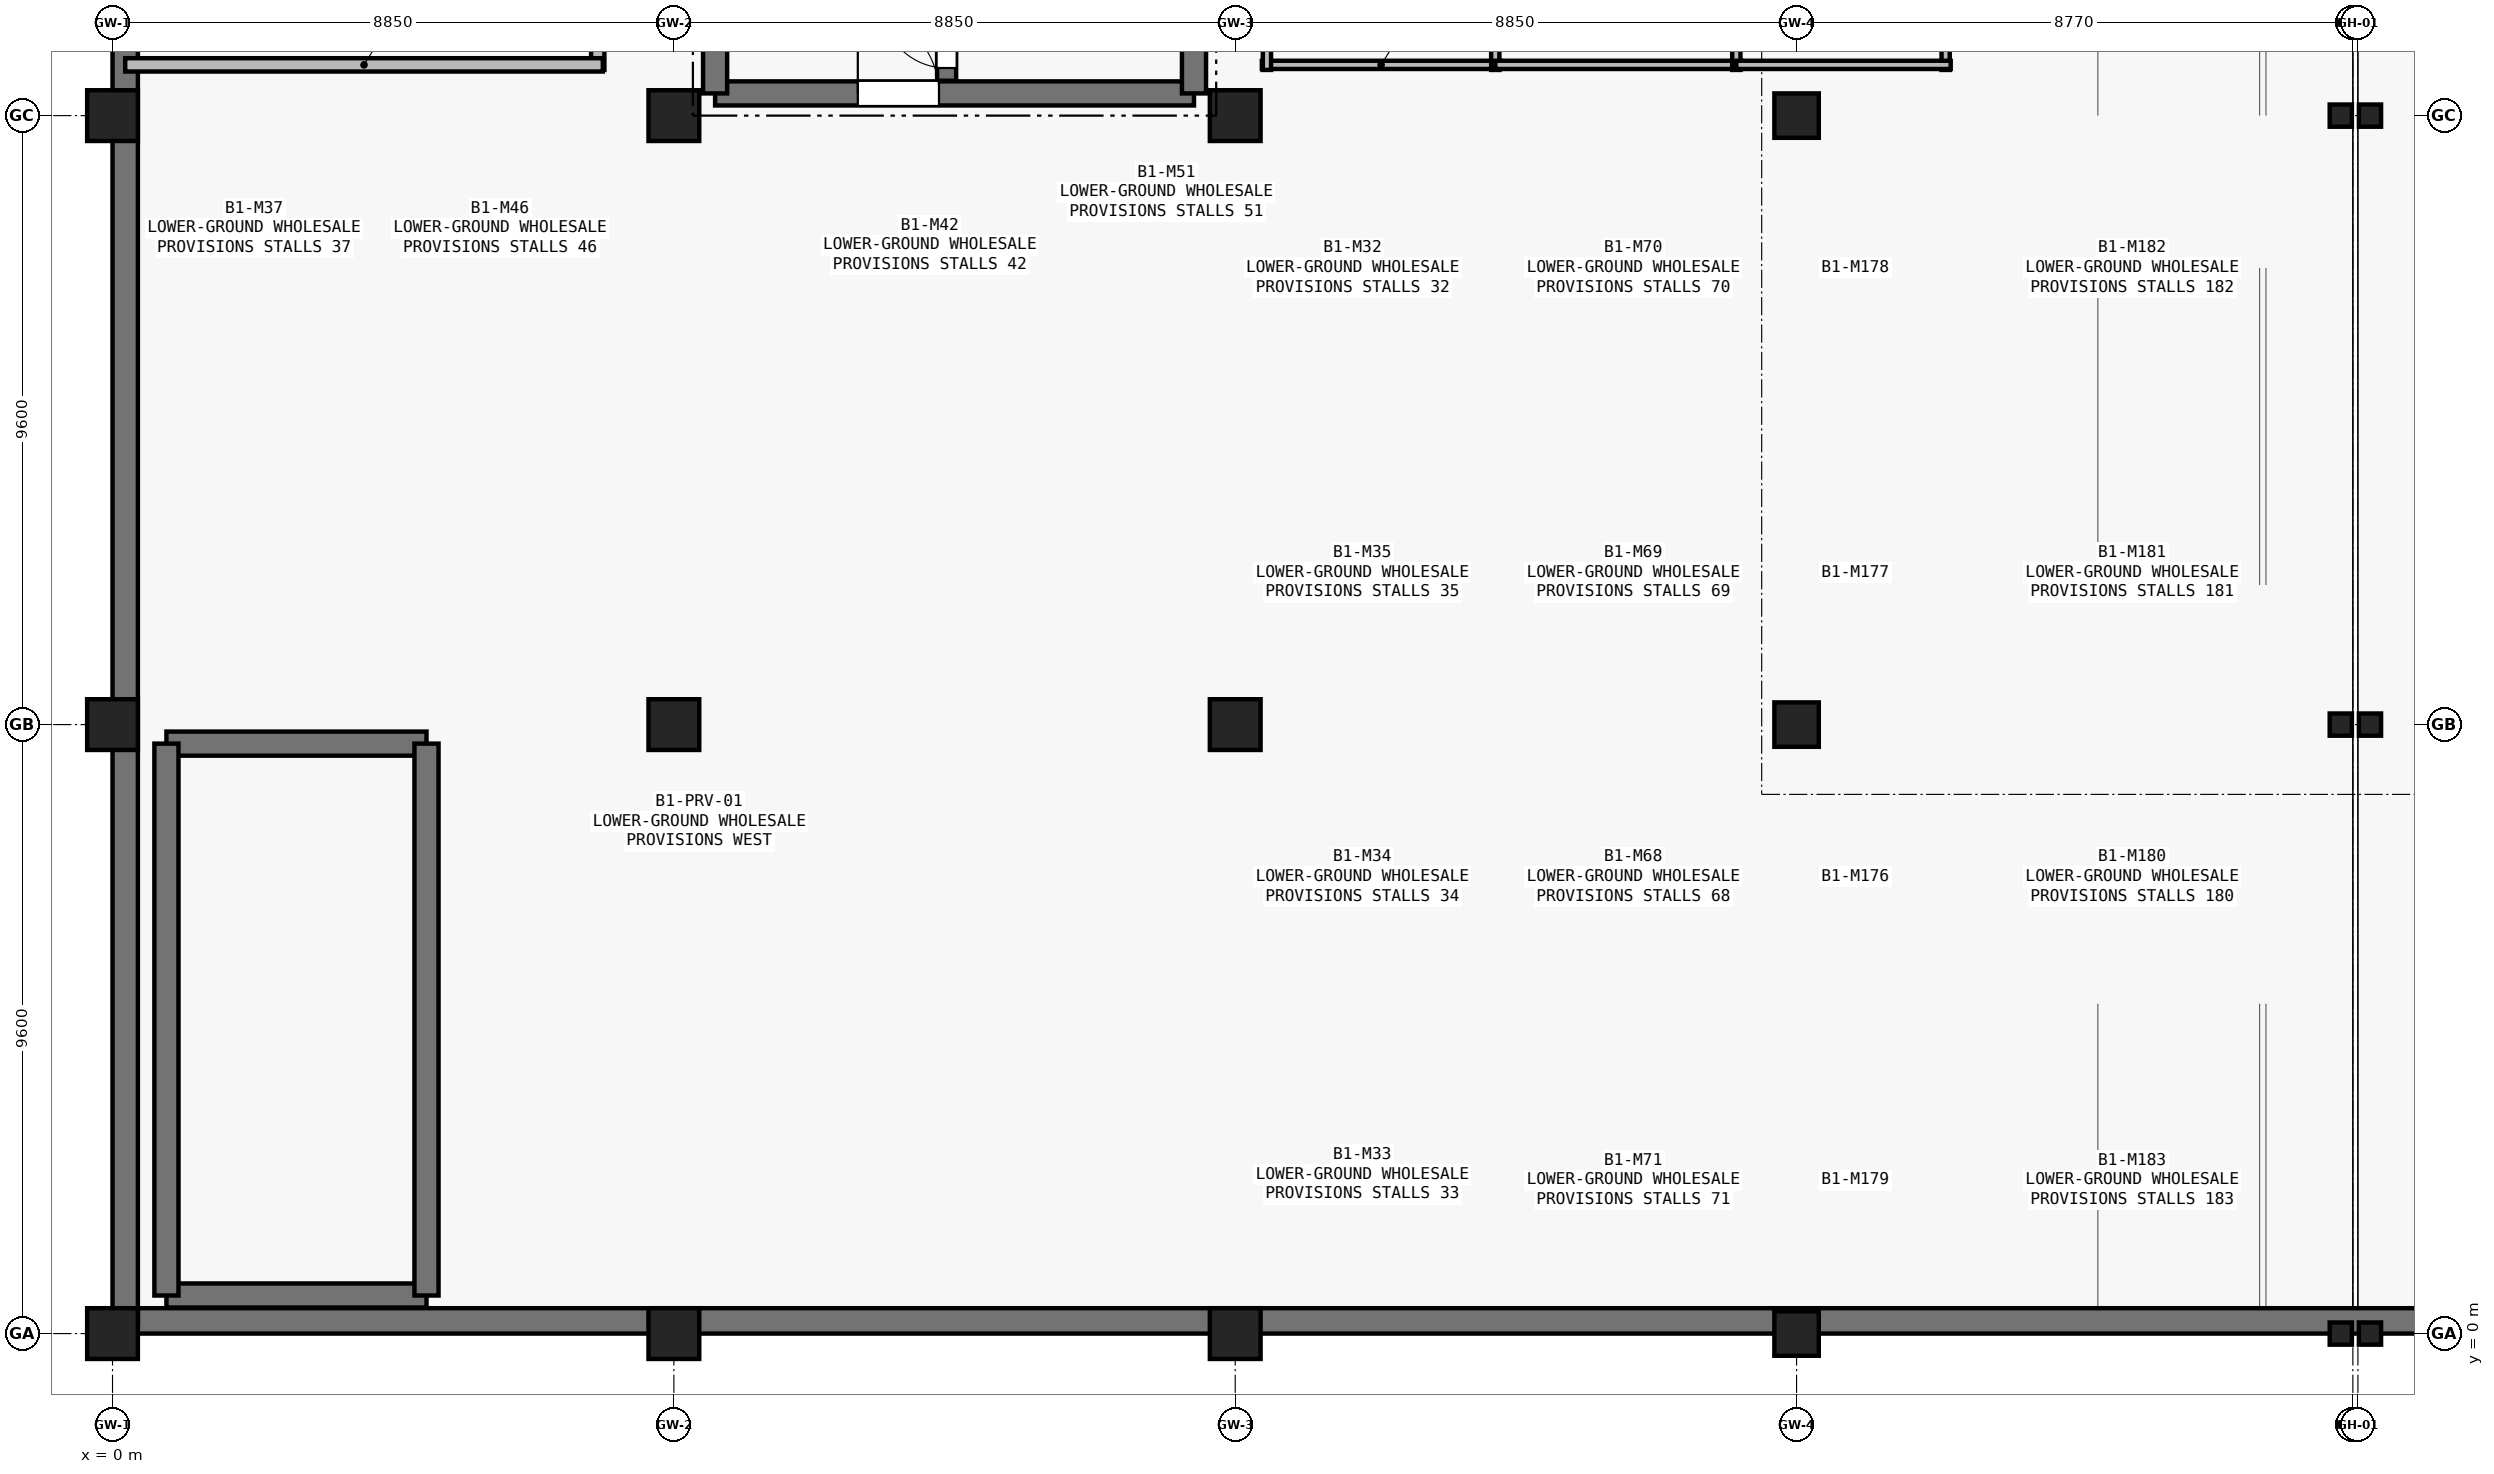
"""IFC4 building model, lengths in metres.
Left out: names, types, materials, properties, quantities, classifications, styles, units other than length and angle.
Written with IfcOpenShell. Run it as: python <this file> out.ifc"""

import sys

from ifc_helpers import new_model, si_unit, direction, frame, frame_2d, origin, origin_2d, place, context, subcontext, project, spatial, rectangle, i_section, extrude, element, fill, save


model = new_model("IFC4")
c1 = context("Model", 3, precision=1e-05, world=origin(), true_north=direction((0.0, 1.0)))
c2 = subcontext(c1, "Body", "Model", "MODEL_VIEW")
j1 = project(units=[si_unit("LENGTHUNIT", "METRE"), si_unit("PLANEANGLEUNIT", "RADIAN")], contexts=[c1])
p1 = place(None, origin())
s1 = spatial("IfcSite", under=j1, at=p1, CompositionType="ELEMENT")
p2 = place(p1, origin())
s2 = spatial("IfcBuilding", under=s1, at=p2, CompositionType="ELEMENT")
p3 = place(p2, frame((0.0, 0.0, -5.4)))
s3 = spatial("IfcBuildingStorey", under=s2, at=p3, CompositionType="ELEMENT", Elevation=-5.4)
for number, where, z_axis, x_axis in (
    (1, (0.0, 0.0, 0.0), (0.0, 0.0, 1.0), (1.0, 0.0, 0.0)),
    (2, (0.0, 9.6, 0.0), (0.0, 0.0, 1.0), (1.0, 0.0, 0.0)),
    (3, (0.0, 19.2, 0.0), (0.0, 0.0, 1.0), (1.0, 0.0, 0.0)),
    (4, (8.85, 0.0, 0.0), (0.0, 0.0, 1.0), (1.0, 0.0, 0.0)),
    (5, (8.85, 9.6, 0.0), (0.0, 0.0, 1.0), (1.0, 0.0, 0.0)),
    (6, (8.85, 19.2, 0.0), (0.0, 0.0, 1.0), (1.0, 0.0, 0.0)),
    (7, (17.7, 0.0, 0.0), (0.0, 0.0, 1.0), (1.0, 0.0, 0.0)),
    (8, (17.7, 9.6, 0.0), (0.0, 0.0, 1.0), (1.0, 0.0, 0.0)),
    (9, (17.7, 19.2, 0.0), (0.0, 0.0, 1.0), (1.0, 0.0, 0.0)),
):
    element("IfcColumn", number, at=place(p3, frame(where, z_axis=z_axis, x_axis=x_axis)), inside=s3, PredefinedType="COLUMN", context=c2, shape_type="SweptSolid", body=[
        extrude(rectangle(XDim=0.8, YDim=0.8, at=origin_2d()), origin(), (0.0, 0.0, 1.0), 5.4),
    ])
for number, where, z_axis, x_axis in (
    (10, (26.55, 0.0, 0.0), (0.0, 0.0, 1.0), (1.0, 0.0, 0.0)),
    (11, (26.55, 9.6, 0.0), (0.0, 0.0, 1.0), (1.0, 0.0, 0.0)),
    (12, (26.55, 19.2, 0.0), (0.0, 0.0, 1.0), (1.0, 0.0, 0.0)),
):
    element("IfcColumn", number, at=place(p3, frame(where, z_axis=z_axis, x_axis=x_axis)), inside=s3, PredefinedType="COLUMN", context=c2, shape_type="SweptSolid", body=[
        extrude(rectangle(XDim=0.7, YDim=0.7, at=origin_2d()), origin(), (0.0, 0.0, 1.0), 5.4),
    ])
for number, where, z_axis, x_axis in (
    (13, (35.13, 0.0, 0.0), (0.0, 0.0, 1.0), (1.0, 0.0, 0.0)),
    (14, (35.13, 9.6, 0.0), (0.0, 0.0, 1.0), (1.0, 0.0, 0.0)),
    (15, (35.13, 19.2, 0.0), (0.0, 0.0, 1.0), (1.0, 0.0, 0.0)),
    (16, (35.59, 0.0, 0.0), (0.0, 0.0, 1.0), (1.0, 0.0, 0.0)),
    (17, (35.59, 9.6, 0.0), (0.0, 0.0, 1.0), (1.0, 0.0, 0.0)),
    (18, (35.59, 19.2, 0.0), (0.0, 0.0, 1.0), (1.0, 0.0, 0.0)),
):
    element("IfcColumn", number, at=place(p3, frame(where, z_axis=z_axis, x_axis=x_axis)), inside=s3, PredefinedType="COLUMN", context=c2, shape_type="SweptSolid", body=[
        extrude(i_section(OverallWidth=0.35, OverallDepth=0.35, WebThickness=0.012, FlangeThickness=0.019, FilletRadius=0.02, at=origin_2d()), origin(), (0.0, 0.0, 1.0), 5.4),
    ])
p4 = place(p3, frame((102.6, 0.2, 0.0), z_axis=(0.0, 0.0, 1.0), x_axis=(-1.0, 0.0, 0.0)))
e19 = element("IfcWall", 19, at=p4, inside=s3, PredefinedType="USERDEFINED", context=c2, shape_type="SweptSolid", body=[
    extrude(rectangle(XDim=102.4, YDim=0.4, at=frame_2d((51.2, 0.0))), origin(), (0.0, 0.0, 1.0), 4.85),
])
p5 = place(p3, frame((0.2, 0.2, 0.0), z_axis=(0.0, 0.0, 1.0), x_axis=(0.0, 1.0, 0.0)))
e20 = element("IfcWall", 20, at=p5, inside=s3, PredefinedType="USERDEFINED", context=c2, shape_type="SweptSolid", body=[
    extrude(rectangle(XDim=35.6, YDim=0.4, at=frame_2d((17.8, 0.0))), origin(), (0.0, 0.0, 1.0), 4.85),
])
p6 = place(p3, frame((9.5, 19.55, 0.0), z_axis=(0.0, 0.0, 1.0), x_axis=(1.0, 0.0, 0.0)))
e21 = element("IfcWall", 21, at=p6, inside=s3, PredefinedType="SHEAR", context=c2, shape_type="SweptSolid", body=[
    extrude(rectangle(XDim=7.55, YDim=0.38, at=frame_2d((3.775, 0.0))), origin(), (0.0, 0.0, 1.0), 5.4),
])
p7 = place(p6, frame((2.25, 0.0, 0.0)))
e22 = element("IfcOpeningElement", 22, at=p7, cuts=e21, PredefinedType="OPENING", context=c2, shape_type="SweptSolid", body=[
    extrude(rectangle(XDim=1.28, YDim=2.15, at=frame_2d((0.64, 1.075))), frame((0.0, 0.2, 0.0), z_axis=(0.0, -1.0, 0.0), x_axis=(1.0, 0.0, 0.0)), (0.0, 0.0, 1.0), 0.4),
])
for number, where, z_axis, x_axis in (
    (23, (9.5, 28.35, 0.0), (0.0, 0.0, 1.0), (0.0, -1.0, 0.0)),
    (24, (17.05, 19.55, 0.0), (0.0, 0.0, 1.0), (0.0, 1.0, 0.0)),
):
    element("IfcWall", number, at=place(p3, frame(where, z_axis=z_axis, x_axis=x_axis)), inside=s3, PredefinedType="SHEAR", context=c2, shape_type="SweptSolid", body=[
        extrude(rectangle(XDim=8.8, YDim=0.38, at=frame_2d((4.4, 0.0))), origin(), (0.0, 0.0, 1.0), 5.4),
    ])
p8 = place(p3, frame((13.15, 19.75, 0.0), z_axis=(0.0, 0.0, 1.0), x_axis=(0.0, 1.0, 0.0)))
e25 = element("IfcWall", 25, at=p8, inside=s3, PredefinedType="SHEAR", context=c2, shape_type="SweptSolid", body=[
    extrude(rectangle(XDim=8.4, YDim=0.3, at=frame_2d((4.2, 0.0))), origin(), (0.0, 0.0, 1.0), 5.4),
])
p9 = place(p8, frame((0.2, 0.0, 0.0)))
e26 = element("IfcOpeningElement", 26, at=p9, cuts=e25, PredefinedType="OPENING", context=c2, shape_type="SweptSolid", body=[
    extrude(rectangle(XDim=1.02, YDim=2.1, at=frame_2d((0.51, 1.05))), frame((0.0, 0.16, 0.0), z_axis=(0.0, -1.0, 0.0), x_axis=(1.0, 0.0, 0.0)), (0.0, 0.0, 1.0), 0.32),
])
for number, where, z_axis, x_axis in (
    (27, (0.85, 0.6, 0.0), (0.0, 0.0, 1.0), (1.0, 0.0, 0.0)),
    (28, (4.95, 9.3, 0.0), (0.0, 0.0, 1.0), (-1.0, 0.0, 0.0)),
):
    element("IfcWall", number, at=place(p3, frame(where, z_axis=z_axis, x_axis=x_axis)), inside=s3, PredefinedType="SHEAR", context=c2, shape_type="SweptSolid", body=[
        extrude(rectangle(XDim=4.1, YDim=0.38, at=frame_2d((2.05, 0.0))), origin(), (0.0, 0.0, 1.0), 5.4),
    ])
for number, where, z_axis, x_axis in (
    (29, (0.85, 9.3, 0.0), (0.0, 0.0, 1.0), (0.0, -1.0, 0.0)),
    (30, (4.95, 0.6, 0.0), (0.0, 0.0, 1.0), (0.0, 1.0, 0.0)),
):
    element("IfcWall", number, at=place(p3, frame(where, z_axis=z_axis, x_axis=x_axis)), inside=s3, PredefinedType="SHEAR", context=c2, shape_type="SweptSolid", body=[
        extrude(rectangle(XDim=8.7, YDim=0.38, at=frame_2d((4.35, 0.0))), origin(), (0.0, 0.0, 1.0), 5.4),
    ])
p10 = place(p3, frame((18.12, 20.0, 0.0), z_axis=(0.0, 0.0, 1.0), x_axis=(1.0, 0.0, 0.0)))
e31 = element("IfcWall", 31, at=p10, inside=s3, PredefinedType="PARTITIONING", context=c2, shape_type="SweptSolid", body=[
    extrude(rectangle(XDim=3.76, YDim=0.13, at=frame_2d((1.88, 0.0))), origin(), (0.0, 0.0, 1.0), 4.92),
])
for number, where, z_axis, x_axis in (
    (32, (21.8, 19.92, 0.0), (0.0, 0.0, 1.0), (0.0, 1.0, 0.0)),
    (33, (18.2, 24.08, 0.0), (0.0, 0.0, 1.0), (0.0, -1.0, 0.0)),
):
    element("IfcWall", number, at=place(p3, frame(where, z_axis=z_axis, x_axis=x_axis)), inside=s3, PredefinedType="PARTITIONING", context=c2, shape_type="SweptSolid", body=[
        extrude(rectangle(XDim=4.16, YDim=0.13, at=frame_2d((2.08, 0.0))), origin(), (0.0, 0.0, 1.0), 4.92),
    ])
p11 = place(p3, frame((21.8, 20.0, 0.0), z_axis=(0.0, 0.0, 1.0), x_axis=(1.0, 0.0, 0.0)))
e34 = element("IfcWall", 34, at=p11, inside=s3, PredefinedType="PARTITIONING", context=c2, shape_type="SweptSolid", body=[
    extrude(rectangle(XDim=3.88, YDim=0.13, at=frame_2d((1.94, 0.0))), origin(), (0.0, 0.0, 1.0), 4.92),
])
p12 = place(p3, frame((25.6, 19.92, 0.0), z_axis=(0.0, 0.0, 1.0), x_axis=(0.0, 1.0, 0.0)))
e35 = element("IfcWall", 35, at=p12, inside=s3, PredefinedType="PARTITIONING", context=c2, shape_type="SweptSolid", body=[
    extrude(rectangle(XDim=4.16, YDim=0.13, at=frame_2d((2.08, 0.0))), origin(), (0.0, 0.0, 1.0), 4.92),
])
p13 = place(p3, frame((28.9, 19.92, 0.0), z_axis=(0.0, 0.0, 1.0), x_axis=(0.0, 1.0, 0.0)))
e36 = element("IfcWall", 36, at=p13, inside=s3, PredefinedType="PARTITIONING", context=c2, shape_type="SweptSolid", body=[
    extrude(rectangle(XDim=4.16, YDim=0.13, at=frame_2d((2.08, 0.0))), origin(), (0.0, 0.0, 1.0), 4.92),
])
p14 = place(p13, frame((1.57, 0.0, 0.0)))
e37 = element("IfcOpeningElement", 37, at=p14, cuts=e36, PredefinedType="OPENING", context=c2, shape_type="SweptSolid", body=[
    extrude(rectangle(XDim=1.02, YDim=2.22, at=frame_2d((0.51, 1.11))), frame((0.0, 0.075, 0.0), z_axis=(0.0, -1.0, 0.0), x_axis=(1.0, 0.0, 0.0)), (0.0, 0.0, 1.0), 0.15),
])
p15 = place(p3, frame((25.6, 20.0, 0.0), z_axis=(0.0, 0.0, 1.0), x_axis=(1.0, 0.0, 0.0)))
e38 = element("IfcWall", 38, at=p15, inside=s3, PredefinedType="PARTITIONING", context=c2, shape_type="SweptSolid", body=[
    extrude(rectangle(XDim=3.38, YDim=0.13, at=frame_2d((1.69, 0.0))), origin(), (0.0, 0.0, 1.0), 4.92),
])
p16 = place(p3, frame((7.65, 19.92, 0.0), z_axis=(0.0, 0.0, 1.0), x_axis=(0.0, 1.0, 0.0)))
e39 = element("IfcWall", 39, at=p16, inside=s3, PredefinedType="PARTITIONING", context=c2, shape_type="SweptSolid", body=[
    extrude(rectangle(XDim=15.66, YDim=0.21, at=frame_2d((7.83, 0.0))), origin(), (0.0, 0.0, 1.0), 4.92),
])
p17 = place(p16, frame((7.26, 0.0, 0.0)))
e40 = element("IfcOpeningElement", 40, at=p17, cuts=e39, PredefinedType="OPENING", context=c2, shape_type="SweptSolid", body=[
    extrude(rectangle(XDim=1.14, YDim=2.1, at=frame_2d((0.57, 1.05))), frame((0.0, 0.115, 0.0), z_axis=(0.0, -1.0, 0.0), x_axis=(1.0, 0.0, 0.0)), (0.0, 0.0, 1.0), 0.23),
])
p18 = place(p3, frame((0.2, 20.0, 0.0), z_axis=(0.0, 0.0, 1.0), x_axis=(1.0, 0.0, 0.0)))
e41 = element("IfcWall", 41, at=p18, inside=s3, PredefinedType="PARTITIONING", context=c2, shape_type="SweptSolid", body=[
    extrude(rectangle(XDim=7.53, YDim=0.21, at=frame_2d((3.765, 0.0))), origin(), (0.0, 0.0, 1.0), 4.92),
])
p19 = place(p7, origin())
e42 = element("IfcDoor", 42, at=p19, inside=s3, OperationType="SINGLE_SWING_LEFT", PredefinedType="DOOR", context=c2, shape_type="SweptSolid", body=[
    extrude(rectangle(XDim=1.28, YDim=2.15, at=frame_2d((0.64, 1.075))), frame((0.0, 0.025, 0.0), z_axis=(0.0, -1.0, 0.0), x_axis=(1.0, 0.0, 0.0)), (0.0, 0.0, 1.0), 0.05),
])
fill(e22, e42)
p20 = place(p9, origin())
e43 = element("IfcDoor", 43, at=p20, inside=s3, OperationType="SINGLE_SWING_RIGHT", PredefinedType="DOOR", context=c2, shape_type="SweptSolid", body=[
    extrude(rectangle(XDim=1.02, YDim=2.1, at=frame_2d((0.51, 1.05))), frame((0.0, 0.025, 0.0), z_axis=(0.0, -1.0, 0.0), x_axis=(1.0, 0.0, 0.0)), (0.0, 0.0, 1.0), 0.05),
])
fill(e26, e43)
save(model, sys.argv[1])
